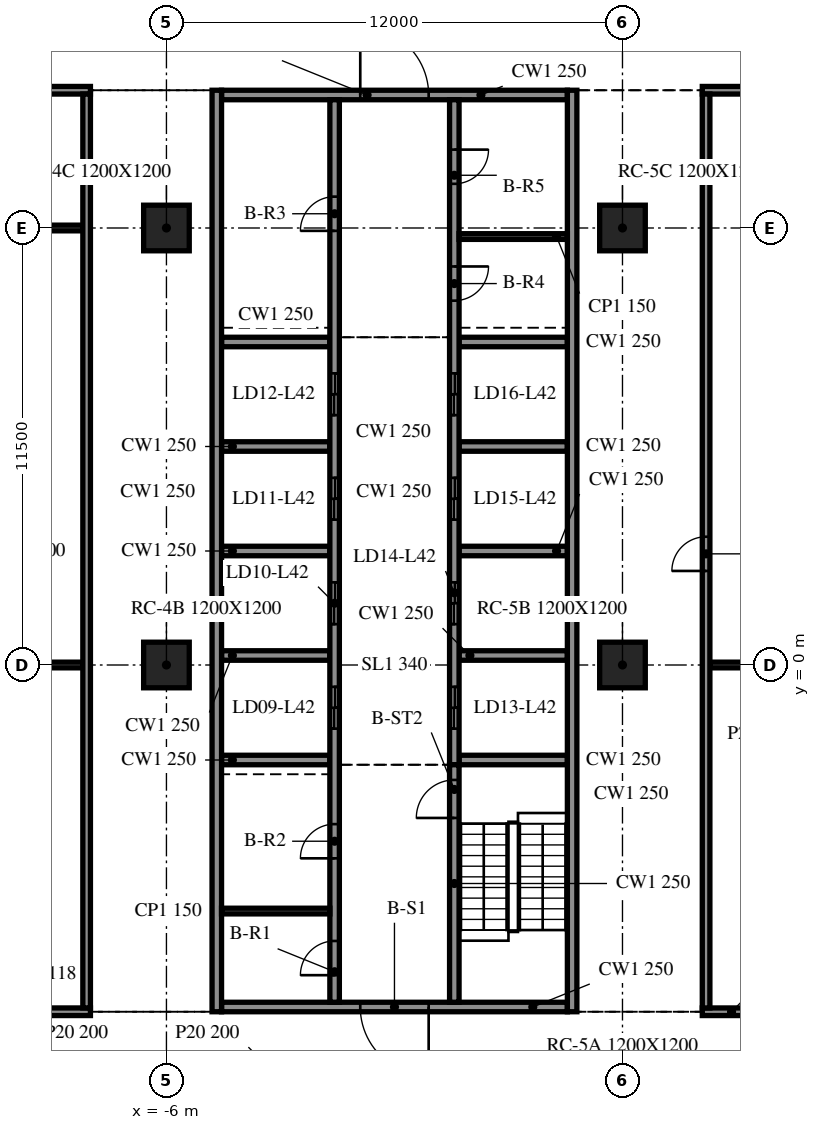
"""IFC4 building model, lengths in metres.
Left out: names, types, materials, properties, quantities, classifications, styles, units other than length and angle.
Written with IfcOpenShell. Run it as: python <this file> out.ifc"""

import sys

from ifc_helpers import new_model, si_unit, direction, frame, frame_2d, origin, origin_2d, place, context, subcontext, project, spatial, rectangle, extrude, element, fill, save


model = new_model("IFC4")
c1 = context("Model", 3, precision=1e-05, world=origin(), true_north=direction((0.0, 1.0)))
c2 = subcontext(c1, "Body", "Model", "MODEL_VIEW")
j1 = project(units=[si_unit("LENGTHUNIT", "METRE"), si_unit("PLANEANGLEUNIT", "RADIAN")], contexts=[c1])
p1 = place(None, origin())
s1 = spatial("IfcSite", under=j1, at=p1, CompositionType="ELEMENT")
p2 = place(p1, origin())
s2 = spatial("IfcBuilding", under=s1, at=p2, CompositionType="ELEMENT")
p3 = place(p2, frame((0.0, 0.0, 178.2)))
s3 = spatial("IfcBuildingStorey", under=s2, at=p3, CompositionType="ELEMENT", Elevation=178.2)
for number, where, z_axis, x_axis in (
    (1, (-6.0, 0.0, -0.34), (0.0, 0.0, 1.0), (1.0, 0.0, 0.0)),
    (2, (-6.0, 11.5, -0.34), (0.0, 0.0, 1.0), (1.0, 0.0, 0.0)),
    (3, (6.0, 0.0, -0.34), (0.0, 0.0, 1.0), (1.0, 0.0, 0.0)),
    (4, (6.0, 11.5, -0.34), (0.0, 0.0, 1.0), (1.0, 0.0, 0.0)),
):
    element("IfcColumn", number, at=place(p3, frame(where, z_axis=z_axis, x_axis=x_axis)), inside=s3, PredefinedType="COLUMN", context=c2, shape_type="SweptSolid", body=[
        extrude(rectangle(XDim=1.2, YDim=1.2, at=origin_2d()), origin(), (0.0, 0.0, 1.0), 3.8),
    ])
for number, where, z_axis, x_axis in (
    (5, (-4.675, 15.125, 0.0), (0.0, 0.0, 1.0), (0.0, -1.0, 0.0)),
    (6, (4.675, -9.125, 0.0), (0.0, 0.0, 1.0), (0.0, 1.0, 0.0)),
):
    element("IfcWall", number, at=place(p3, frame(where, z_axis=z_axis, x_axis=x_axis)), inside=s3, PredefinedType="SOLIDWALL", context=c2, shape_type="SweptSolid", body=[
        extrude(rectangle(XDim=24.25, YDim=0.25, at=frame_2d((12.125, 0.0))), origin(), (0.0, 0.0, 1.0), 3.46),
    ])
p4 = place(p3, frame((4.55, -9.0, 0.0), z_axis=(0.0, 0.0, 1.0), x_axis=(-1.0, 0.0, 0.0)))
e7 = element("IfcWall", 7, at=p4, inside=s3, PredefinedType="SOLIDWALL", context=c2, shape_type="SweptSolid", body=[
    extrude(rectangle(XDim=9.1, YDim=0.25, at=frame_2d((4.55, 0.0))), origin(), (0.0, 0.0, 1.0), 3.46),
])
p5 = place(p4, frame((3.65, 0.0, 0.0)))
e8 = element("IfcOpeningElement", 8, at=p5, cuts=e7, PredefinedType="OPENING", context=c2, shape_type="SweptSolid", body=[
    extrude(rectangle(XDim=1.8, YDim=2.1, at=frame_2d((0.9, 1.05))), frame((0.0, 0.135, 0.0), z_axis=(0.0, -1.0, 0.0), x_axis=(1.0, 0.0, 0.0)), (0.0, 0.0, 1.0), 0.27),
])
p6 = place(p3, frame((-4.55, 15.0, 0.0), z_axis=(0.0, 0.0, 1.0), x_axis=(1.0, 0.0, 0.0)))
e9 = element("IfcWall", 9, at=p6, inside=s3, PredefinedType="SOLIDWALL", context=c2, shape_type="SweptSolid", body=[
    extrude(rectangle(XDim=9.1, YDim=0.25, at=frame_2d((4.55, 0.0))), origin(), (0.0, 0.0, 1.0), 3.46),
])
p7 = place(p6, frame((3.65, 0.0, 0.0)))
e10 = element("IfcOpeningElement", 10, at=p7, cuts=e9, PredefinedType="OPENING", context=c2, shape_type="SweptSolid", body=[
    extrude(rectangle(XDim=1.8, YDim=2.1, at=frame_2d((0.9, 1.05))), frame((0.0, 0.135, 0.0), z_axis=(0.0, -1.0, 0.0), x_axis=(1.0, 0.0, 0.0)), (0.0, 0.0, 1.0), 0.27),
])
p8 = place(p3, frame((-1.575, -8.875, 0.0), z_axis=(0.0, 0.0, 1.0), x_axis=(0.0, 1.0, 0.0)))
e11 = element("IfcWall", 11, at=p8, inside=s3, PredefinedType="SOLIDWALL", context=c2, shape_type="SweptSolid", body=[
    extrude(rectangle(XDim=23.75, YDim=0.25, at=frame_2d((11.875, 0.0))), origin(), (0.0, 0.0, 1.0), 3.46),
])
p9 = place(p8, frame((7.2, 0.0, 0.0)))
e12 = element("IfcOpeningElement", 12, at=p9, cuts=e11, PredefinedType="OPENING", context=c2, shape_type="SweptSolid", body=[
    extrude(rectangle(XDim=1.1, YDim=2.1, at=frame_2d((0.55, 1.05))), frame((0.0, 0.135, 0.0), z_axis=(0.0, -1.0, 0.0), x_axis=(1.0, 0.0, 0.0)), (0.0, 0.0, 1.0), 0.27),
])
p10 = place(p8, frame((9.95, 0.0, 0.0)))
e13 = element("IfcOpeningElement", 13, at=p10, cuts=e11, PredefinedType="OPENING", context=c2, shape_type="SweptSolid", body=[
    extrude(rectangle(XDim=1.1, YDim=2.1, at=frame_2d((0.55, 1.05))), frame((0.0, 0.135, 0.0), z_axis=(0.0, -1.0, 0.0), x_axis=(1.0, 0.0, 0.0)), (0.0, 0.0, 1.0), 0.27),
])
p11 = place(p8, frame((12.7, 0.0, 0.0)))
e14 = element("IfcOpeningElement", 14, at=p11, cuts=e11, PredefinedType="OPENING", context=c2, shape_type="SweptSolid", body=[
    extrude(rectangle(XDim=1.1, YDim=2.1, at=frame_2d((0.55, 1.05))), frame((0.0, 0.135, 0.0), z_axis=(0.0, -1.0, 0.0), x_axis=(1.0, 0.0, 0.0)), (0.0, 0.0, 1.0), 0.27),
])
p12 = place(p8, frame((15.45, 0.0, 0.0)))
e15 = element("IfcOpeningElement", 15, at=p12, cuts=e11, PredefinedType="OPENING", context=c2, shape_type="SweptSolid", body=[
    extrude(rectangle(XDim=1.1, YDim=2.1, at=frame_2d((0.55, 1.05))), frame((0.0, 0.135, 0.0), z_axis=(0.0, -1.0, 0.0), x_axis=(1.0, 0.0, 0.0)), (0.0, 0.0, 1.0), 0.27),
])
p13 = place(p8, frame((0.712, 0.0, 0.0)))
e16 = element("IfcOpeningElement", 16, at=p13, cuts=e11, PredefinedType="OPENING", context=c2, shape_type="SweptSolid", body=[
    extrude(rectangle(XDim=0.9, YDim=2.1, at=frame_2d((0.45, 1.05))), frame((0.0, 0.135, 0.0), z_axis=(0.0, -1.0, 0.0), x_axis=(1.0, 0.0, 0.0)), (0.0, 0.0, 1.0), 0.27),
])
p14 = place(p8, frame((3.788, 0.0, 0.0)))
e17 = element("IfcOpeningElement", 17, at=p14, cuts=e11, PredefinedType="OPENING", context=c2, shape_type="SweptSolid", body=[
    extrude(rectangle(XDim=0.9, YDim=2.1, at=frame_2d((0.45, 1.05))), frame((0.0, 0.135, 0.0), z_axis=(0.0, -1.0, 0.0), x_axis=(1.0, 0.0, 0.0)), (0.0, 0.0, 1.0), 0.27),
])
p15 = place(p8, frame((20.3, 0.0, 0.0)))
e18 = element("IfcOpeningElement", 18, at=p15, cuts=e11, PredefinedType="OPENING", context=c2, shape_type="SweptSolid", body=[
    extrude(rectangle(XDim=0.9, YDim=2.1, at=frame_2d((0.45, 1.05))), frame((0.0, 0.135, 0.0), z_axis=(0.0, -1.0, 0.0), x_axis=(1.0, 0.0, 0.0)), (0.0, 0.0, 1.0), 0.27),
])
p16 = place(p3, frame((1.575, -8.875, 0.0), z_axis=(0.0, 0.0, 1.0), x_axis=(0.0, 1.0, 0.0)))
e19 = element("IfcWall", 19, at=p16, inside=s3, PredefinedType="SOLIDWALL", context=c2, shape_type="SweptSolid", body=[
    extrude(rectangle(XDim=6.25, YDim=0.25, at=frame_2d((3.125, 0.0))), origin(), (0.0, 0.0, 1.0), 3.46),
])
p17 = place(p16, frame((4.85, 0.0, 0.0)))
e20 = element("IfcOpeningElement", 20, at=p17, cuts=e19, PredefinedType="OPENING", context=c2, shape_type="SweptSolid", body=[
    extrude(rectangle(XDim=1.0, YDim=2.1, at=frame_2d((0.5, 1.05))), frame((0.0, 0.135, 0.0), z_axis=(0.0, -1.0, 0.0), x_axis=(1.0, 0.0, 0.0)), (0.0, 0.0, 1.0), 0.27),
])
p18 = place(p3, frame((1.575, 14.875, 0.0), z_axis=(0.0, 0.0, 1.0), x_axis=(0.0, -1.0, 0.0)))
e21 = element("IfcWall", 21, at=p18, inside=s3, PredefinedType="SOLIDWALL", context=c2, shape_type="SweptSolid", body=[
    extrude(rectangle(XDim=17.5, YDim=0.25, at=frame_2d((8.75, 0.0))), origin(), (0.0, 0.0, 1.0), 3.46),
])
p19 = place(p18, frame((15.45, 0.0, 0.0)))
e22 = element("IfcOpeningElement", 22, at=p19, cuts=e21, PredefinedType="OPENING", context=c2, shape_type="SweptSolid", body=[
    extrude(rectangle(XDim=1.1, YDim=2.1, at=frame_2d((0.55, 1.05))), frame((0.0, 0.135, 0.0), z_axis=(0.0, -1.0, 0.0), x_axis=(1.0, 0.0, 0.0)), (0.0, 0.0, 1.0), 0.27),
])
p20 = place(p18, frame((12.7, 0.0, 0.0)))
e23 = element("IfcOpeningElement", 23, at=p20, cuts=e21, PredefinedType="OPENING", context=c2, shape_type="SweptSolid", body=[
    extrude(rectangle(XDim=1.1, YDim=2.1, at=frame_2d((0.55, 1.05))), frame((0.0, 0.135, 0.0), z_axis=(0.0, -1.0, 0.0), x_axis=(1.0, 0.0, 0.0)), (0.0, 0.0, 1.0), 0.27),
])
p21 = place(p18, frame((9.95, 0.0, 0.0)))
e24 = element("IfcOpeningElement", 24, at=p21, cuts=e21, PredefinedType="OPENING", context=c2, shape_type="SweptSolid", body=[
    extrude(rectangle(XDim=1.1, YDim=2.1, at=frame_2d((0.55, 1.05))), frame((0.0, 0.135, 0.0), z_axis=(0.0, -1.0, 0.0), x_axis=(1.0, 0.0, 0.0)), (0.0, 0.0, 1.0), 0.27),
])
p22 = place(p18, frame((7.2, 0.0, 0.0)))
e25 = element("IfcOpeningElement", 25, at=p22, cuts=e21, PredefinedType="OPENING", context=c2, shape_type="SweptSolid", body=[
    extrude(rectangle(XDim=1.1, YDim=2.1, at=frame_2d((0.55, 1.05))), frame((0.0, 0.135, 0.0), z_axis=(0.0, -1.0, 0.0), x_axis=(1.0, 0.0, 0.0)), (0.0, 0.0, 1.0), 0.27),
])
p23 = place(p18, frame((4.387, 0.0, 0.0)))
e26 = element("IfcOpeningElement", 26, at=p23, cuts=e21, PredefinedType="OPENING", context=c2, shape_type="SweptSolid", body=[
    extrude(rectangle(XDim=0.9, YDim=2.1, at=frame_2d((0.45, 1.05))), frame((0.0, 0.135, 0.0), z_axis=(0.0, -1.0, 0.0), x_axis=(1.0, 0.0, 0.0)), (0.0, 0.0, 1.0), 0.27),
])
p24 = place(p18, frame((1.312, 0.0, 0.0)))
e27 = element("IfcOpeningElement", 27, at=p24, cuts=e21, PredefinedType="OPENING", context=c2, shape_type="SweptSolid", body=[
    extrude(rectangle(XDim=0.9, YDim=2.1, at=frame_2d((0.45, 1.05))), frame((0.0, 0.135, 0.0), z_axis=(0.0, -1.0, 0.0), x_axis=(1.0, 0.0, 0.0)), (0.0, 0.0, 1.0), 0.27),
])
for number, where, z_axis, x_axis in (
    (28, (-4.55, -2.5, 0.0), (0.0, 0.0, 1.0), (1.0, 0.0, 0.0)),
    (29, (-4.55, 0.25, 0.0), (0.0, 0.0, 1.0), (1.0, 0.0, 0.0)),
    (30, (-4.55, 3.0, 0.0), (0.0, 0.0, 1.0), (1.0, 0.0, 0.0)),
    (31, (-4.55, 5.75, 0.0), (0.0, 0.0, 1.0), (1.0, 0.0, 0.0)),
    (32, (-4.55, 8.5, 0.0), (0.0, 0.0, 1.0), (1.0, 0.0, 0.0)),
    (33, (1.7, -2.5, 0.0), (0.0, 0.0, 1.0), (1.0, 0.0, 0.0)),
    (34, (1.7, 0.25, 0.0), (0.0, 0.0, 1.0), (1.0, 0.0, 0.0)),
    (35, (1.7, 3.0, 0.0), (0.0, 0.0, 1.0), (1.0, 0.0, 0.0)),
    (36, (1.7, 5.75, 0.0), (0.0, 0.0, 1.0), (1.0, 0.0, 0.0)),
    (37, (1.7, 8.5, 0.0), (0.0, 0.0, 1.0), (1.0, 0.0, 0.0)),
):
    element("IfcWall", number, at=place(p3, frame(where, z_axis=z_axis, x_axis=x_axis)), inside=s3, PredefinedType="SOLIDWALL", context=c2, shape_type="SweptSolid", body=[
        extrude(rectangle(XDim=2.85, YDim=0.25, at=frame_2d((1.425, 0.0))), origin(), (0.0, 0.0, 1.0), 3.46),
    ])
for number, where, z_axis, x_axis in (
    (38, (-4.55, -6.475, 0.0), (0.0, 0.0, 1.0), (1.0, 0.0, 0.0)),
    (39, (1.7, 11.275, 0.0), (0.0, 0.0, 1.0), (1.0, 0.0, 0.0)),
):
    element("IfcWall", number, at=place(p3, frame(where, z_axis=z_axis, x_axis=x_axis)), inside=s3, PredefinedType="PARTITIONING", context=c2, shape_type="SweptSolid", body=[
        extrude(rectangle(XDim=2.85, YDim=0.15, at=frame_2d((1.425, 0.0))), origin(), (0.0, 0.0, 1.0), 3.46),
    ])
p25 = place(p3, frame((-16.1, -9.125, 0.0), z_axis=(0.0, 0.0, 1.0), x_axis=(1.0, 0.0, 0.0)))
e40 = element("IfcWall", 40, at=p25, inside=s3, PredefinedType="PARTITIONING", context=c2, shape_type="SweptSolid", body=[
    extrude(rectangle(XDim=8.1, YDim=0.2, at=frame_2d((4.05, 0.0))), origin(), (0.0, 0.0, 1.0), 3.46),
])
p26 = place(p25, frame((3.5, 0.0, 0.0)))
e41 = element("IfcOpeningElement", 41, at=p26, cuts=e40, PredefinedType="OPENING", context=c2, shape_type="SweptSolid", body=[
    extrude(rectangle(XDim=1.0, YDim=2.1, at=frame_2d((0.5, 1.05))), frame((0.0, 0.11, 0.0), z_axis=(0.0, -1.0, 0.0), x_axis=(1.0, 0.0, 0.0)), (0.0, 0.0, 1.0), 0.22),
])
p27 = place(p3, frame((8.1, -9.125, 0.0), z_axis=(0.0, 0.0, 1.0), x_axis=(1.0, 0.0, 0.0)))
e42 = element("IfcWall", 42, at=p27, inside=s3, PredefinedType="PARTITIONING", context=c2, shape_type="SweptSolid", body=[
    extrude(rectangle(XDim=7.7, YDim=0.2, at=frame_2d((3.85, 0.0))), origin(), (0.0, 0.0, 1.0), 3.46),
])
p28 = place(p27, frame((3.3, 0.0, 0.0)))
e43 = element("IfcOpeningElement", 43, at=p28, cuts=e42, PredefinedType="OPENING", context=c2, shape_type="SweptSolid", body=[
    extrude(rectangle(XDim=1.0, YDim=2.1, at=frame_2d((0.5, 1.05))), frame((0.0, 0.11, 0.0), z_axis=(0.0, -1.0, 0.0), x_axis=(1.0, 0.0, 0.0)), (0.0, 0.0, 1.0), 0.22),
])
p29 = place(p3, frame((-15.9, 0.0, 0.0), z_axis=(0.0, 0.0, 1.0), x_axis=(1.0, 0.0, 0.0)))
e44 = element("IfcWall", 44, at=p29, inside=s3, PredefinedType="PARTITIONING", context=c2, shape_type="SweptSolid", body=[
    extrude(rectangle(XDim=7.7, YDim=0.15, at=frame_2d((3.85, 0.0))), origin(), (0.0, 0.0, 1.0), 3.46),
])
p30 = place(p3, frame((8.3, 0.0, 0.0), z_axis=(0.0, 0.0, 1.0), x_axis=(1.0, 0.0, 0.0)))
e45 = element("IfcWall", 45, at=p30, inside=s3, PredefinedType="PARTITIONING", context=c2, shape_type="SweptSolid", body=[
    extrude(rectangle(XDim=7.3, YDim=0.15, at=frame_2d((3.65, 0.0))), origin(), (0.0, 0.0, 1.0), 3.46),
])
p31 = place(p3, frame((-15.9, 11.5, 0.0), z_axis=(0.0, 0.0, 1.0), x_axis=(1.0, 0.0, 0.0)))
e46 = element("IfcWall", 46, at=p31, inside=s3, PredefinedType="PARTITIONING", context=c2, shape_type="SweptSolid", body=[
    extrude(rectangle(XDim=7.7, YDim=0.15, at=frame_2d((3.85, 0.0))), origin(), (0.0, 0.0, 1.0), 3.46),
])
p32 = place(p3, frame((-16.1, 15.125, 0.0), z_axis=(0.0, 0.0, 1.0), x_axis=(1.0, 0.0, 0.0)))
e47 = element("IfcWall", 47, at=p32, inside=s3, PredefinedType="PARTITIONING", context=c2, shape_type="SweptSolid", body=[
    extrude(rectangle(XDim=8.1, YDim=0.2, at=frame_2d((4.05, 0.0))), origin(), (0.0, 0.0, 1.0), 3.46),
])
p33 = place(p32, frame((3.5, 0.0, 0.0)))
e48 = element("IfcOpeningElement", 48, at=p33, cuts=e47, PredefinedType="OPENING", context=c2, shape_type="SweptSolid", body=[
    extrude(rectangle(XDim=1.0, YDim=2.1, at=frame_2d((0.5, 1.05))), frame((0.0, 0.11, 0.0), z_axis=(0.0, -1.0, 0.0), x_axis=(1.0, 0.0, 0.0)), (0.0, 0.0, 1.0), 0.22),
])
p34 = place(p3, frame((8.1, 15.125, 0.0), z_axis=(0.0, 0.0, 1.0), x_axis=(1.0, 0.0, 0.0)))
e49 = element("IfcWall", 49, at=p34, inside=s3, PredefinedType="PARTITIONING", context=c2, shape_type="SweptSolid", body=[
    extrude(rectangle(XDim=7.7, YDim=0.2, at=frame_2d((3.85, 0.0))), origin(), (0.0, 0.0, 1.0), 3.46),
])
p35 = place(p3, frame((-8.1, -9.025, 0.0), z_axis=(0.0, 0.0, 1.0), x_axis=(0.0, 1.0, 0.0)))
e50 = element("IfcWall", 50, at=p35, inside=s3, PredefinedType="PARTITIONING", context=c2, shape_type="SweptSolid", body=[
    extrude(rectangle(XDim=24.05, YDim=0.2, at=frame_2d((12.025, 0.0))), origin(), (0.0, 0.0, 1.0), 3.46),
])
p36 = place(p3, frame((8.2, -9.025, 0.0), z_axis=(0.0, 0.0, 1.0), x_axis=(0.0, 1.0, 0.0)))
e51 = element("IfcWall", 51, at=p36, inside=s3, PredefinedType="PARTITIONING", context=c2, shape_type="SweptSolid", body=[
    extrude(rectangle(XDim=24.05, YDim=0.2, at=frame_2d((12.025, 0.0))), origin(), (0.0, 0.0, 1.0), 3.46),
])
p37 = place(p36, frame((11.5, 0.0, 0.0)))
e52 = element("IfcOpeningElement", 52, at=p37, cuts=e51, PredefinedType="OPENING", context=c2, shape_type="SweptSolid", body=[
    extrude(rectangle(XDim=0.9, YDim=2.1, at=frame_2d((0.45, 1.05))), frame((0.0, 0.11, 0.0), z_axis=(0.0, -1.0, 0.0), x_axis=(1.0, 0.0, 0.0)), (0.0, 0.0, 1.0), 0.22),
])
p38 = place(p5, origin())
e53 = element("IfcDoor", 53, at=p38, inside=s3, OperationType="DOUBLE_DOOR_SINGLE_SWING", PredefinedType="DOOR", context=c2, shape_type="SweptSolid", body=[
    extrude(rectangle(XDim=1.8, YDim=2.1, at=frame_2d((0.9, 1.05))), frame((0.0, 0.025, 0.0), z_axis=(0.0, -1.0, 0.0), x_axis=(1.0, 0.0, 0.0)), (0.0, 0.0, 1.0), 0.05),
])
fill(e8, e53)
p39 = place(p7, origin())
e54 = element("IfcDoor", 54, at=p39, inside=s3, OperationType="DOUBLE_DOOR_SINGLE_SWING", PredefinedType="DOOR", context=c2, shape_type="SweptSolid", body=[
    extrude(rectangle(XDim=1.8, YDim=2.1, at=frame_2d((0.9, 1.05))), frame((0.0, 0.025, 0.0), z_axis=(0.0, -1.0, 0.0), x_axis=(1.0, 0.0, 0.0)), (0.0, 0.0, 1.0), 0.05),
])
fill(e10, e54)
p40 = place(p19, origin())
e55 = element("IfcDoor", 55, at=p40, inside=s3, OperationType="DOUBLE_DOOR_SLIDING", PredefinedType="DOOR", context=c2, shape_type="SweptSolid", body=[
    extrude(rectangle(XDim=1.1, YDim=2.1, at=frame_2d((0.55, 1.05))), frame((0.0, 0.025, 0.0), z_axis=(0.0, -1.0, 0.0), x_axis=(1.0, 0.0, 0.0)), (0.0, 0.0, 1.0), 0.05),
])
fill(e22, e55)
p41 = place(p20, origin())
e56 = element("IfcDoor", 56, at=p41, inside=s3, OperationType="DOUBLE_DOOR_SLIDING", PredefinedType="DOOR", context=c2, shape_type="SweptSolid", body=[
    extrude(rectangle(XDim=1.1, YDim=2.1, at=frame_2d((0.55, 1.05))), frame((0.0, 0.025, 0.0), z_axis=(0.0, -1.0, 0.0), x_axis=(1.0, 0.0, 0.0)), (0.0, 0.0, 1.0), 0.05),
])
fill(e23, e56)
p42 = place(p21, origin())
e57 = element("IfcDoor", 57, at=p42, inside=s3, OperationType="DOUBLE_DOOR_SLIDING", PredefinedType="DOOR", context=c2, shape_type="SweptSolid", body=[
    extrude(rectangle(XDim=1.1, YDim=2.1, at=frame_2d((0.55, 1.05))), frame((0.0, 0.025, 0.0), z_axis=(0.0, -1.0, 0.0), x_axis=(1.0, 0.0, 0.0)), (0.0, 0.0, 1.0), 0.05),
])
fill(e24, e57)
p43 = place(p22, origin())
e58 = element("IfcDoor", 58, at=p43, inside=s3, OperationType="DOUBLE_DOOR_SLIDING", PredefinedType="DOOR", context=c2, shape_type="SweptSolid", body=[
    extrude(rectangle(XDim=1.1, YDim=2.1, at=frame_2d((0.55, 1.05))), frame((0.0, 0.025, 0.0), z_axis=(0.0, -1.0, 0.0), x_axis=(1.0, 0.0, 0.0)), (0.0, 0.0, 1.0), 0.05),
])
fill(e25, e58)
p44 = place(p9, origin())
e59 = element("IfcDoor", 59, at=p44, inside=s3, OperationType="DOUBLE_DOOR_SLIDING", PredefinedType="DOOR", context=c2, shape_type="SweptSolid", body=[
    extrude(rectangle(XDim=1.1, YDim=2.1, at=frame_2d((0.55, 1.05))), frame((0.0, 0.025, 0.0), z_axis=(0.0, -1.0, 0.0), x_axis=(1.0, 0.0, 0.0)), (0.0, 0.0, 1.0), 0.05),
])
fill(e12, e59)
p45 = place(p10, origin())
e60 = element("IfcDoor", 60, at=p45, inside=s3, OperationType="DOUBLE_DOOR_SLIDING", PredefinedType="DOOR", context=c2, shape_type="SweptSolid", body=[
    extrude(rectangle(XDim=1.1, YDim=2.1, at=frame_2d((0.55, 1.05))), frame((0.0, 0.025, 0.0), z_axis=(0.0, -1.0, 0.0), x_axis=(1.0, 0.0, 0.0)), (0.0, 0.0, 1.0), 0.05),
])
fill(e13, e60)
p46 = place(p11, origin())
e61 = element("IfcDoor", 61, at=p46, inside=s3, OperationType="DOUBLE_DOOR_SLIDING", PredefinedType="DOOR", context=c2, shape_type="SweptSolid", body=[
    extrude(rectangle(XDim=1.1, YDim=2.1, at=frame_2d((0.55, 1.05))), frame((0.0, 0.025, 0.0), z_axis=(0.0, -1.0, 0.0), x_axis=(1.0, 0.0, 0.0)), (0.0, 0.0, 1.0), 0.05),
])
fill(e14, e61)
p47 = place(p12, origin())
e62 = element("IfcDoor", 62, at=p47, inside=s3, OperationType="DOUBLE_DOOR_SLIDING", PredefinedType="DOOR", context=c2, shape_type="SweptSolid", body=[
    extrude(rectangle(XDim=1.1, YDim=2.1, at=frame_2d((0.55, 1.05))), frame((0.0, 0.025, 0.0), z_axis=(0.0, -1.0, 0.0), x_axis=(1.0, 0.0, 0.0)), (0.0, 0.0, 1.0), 0.05),
])
fill(e15, e62)
p48 = place(p13, origin())
e63 = element("IfcDoor", 63, at=p48, inside=s3, OperationType="SINGLE_SWING_LEFT", PredefinedType="DOOR", context=c2, shape_type="SweptSolid", body=[
    extrude(rectangle(XDim=0.9, YDim=2.1, at=frame_2d((0.45, 1.05))), frame((0.0, 0.025, 0.0), z_axis=(0.0, -1.0, 0.0), x_axis=(1.0, 0.0, 0.0)), (0.0, 0.0, 1.0), 0.05),
])
fill(e16, e63)
p49 = place(p14, origin())
e64 = element("IfcDoor", 64, at=p49, inside=s3, OperationType="SINGLE_SWING_RIGHT", PredefinedType="DOOR", context=c2, shape_type="SweptSolid", body=[
    extrude(rectangle(XDim=0.9, YDim=2.1, at=frame_2d((0.45, 1.05))), frame((0.0, 0.025, 0.0), z_axis=(0.0, -1.0, 0.0), x_axis=(1.0, 0.0, 0.0)), (0.0, 0.0, 1.0), 0.05),
])
fill(e17, e64)
p50 = place(p15, origin())
e65 = element("IfcDoor", 65, at=p50, inside=s3, OperationType="SINGLE_SWING_LEFT", PredefinedType="DOOR", context=c2, shape_type="SweptSolid", body=[
    extrude(rectangle(XDim=0.9, YDim=2.1, at=frame_2d((0.45, 1.05))), frame((0.0, 0.025, 0.0), z_axis=(0.0, -1.0, 0.0), x_axis=(1.0, 0.0, 0.0)), (0.0, 0.0, 1.0), 0.05),
])
fill(e18, e65)
p51 = place(p23, origin())
e66 = element("IfcDoor", 66, at=p51, inside=s3, OperationType="SINGLE_SWING_RIGHT", PredefinedType="DOOR", context=c2, shape_type="SweptSolid", body=[
    extrude(rectangle(XDim=0.9, YDim=2.1, at=frame_2d((0.45, 1.05))), frame((0.0, 0.025, 0.0), z_axis=(0.0, -1.0, 0.0), x_axis=(1.0, 0.0, 0.0)), (0.0, 0.0, 1.0), 0.05),
])
fill(e26, e66)
p52 = place(p24, origin())
e67 = element("IfcDoor", 67, at=p52, inside=s3, OperationType="SINGLE_SWING_LEFT", PredefinedType="DOOR", context=c2, shape_type="SweptSolid", body=[
    extrude(rectangle(XDim=0.9, YDim=2.1, at=frame_2d((0.45, 1.05))), frame((0.0, 0.025, 0.0), z_axis=(0.0, -1.0, 0.0), x_axis=(1.0, 0.0, 0.0)), (0.0, 0.0, 1.0), 0.05),
])
fill(e27, e67)
p53 = place(p17, origin())
e68 = element("IfcDoor", 68, at=p53, inside=s3, OperationType="SINGLE_SWING_RIGHT", PredefinedType="DOOR", context=c2, shape_type="SweptSolid", body=[
    extrude(rectangle(XDim=1.0, YDim=2.1, at=frame_2d((0.5, 1.05))), frame((0.0, 0.025, 0.0), z_axis=(0.0, -1.0, 0.0), x_axis=(1.0, 0.0, 0.0)), (0.0, 0.0, 1.0), 0.05),
])
fill(e20, e68)
p54 = place(p37, origin())
e69 = element("IfcDoor", 69, at=p54, inside=s3, OperationType="SINGLE_SWING_RIGHT", PredefinedType="DOOR", context=c2, shape_type="SweptSolid", body=[
    extrude(rectangle(XDim=0.9, YDim=2.1, at=frame_2d((0.45, 1.05))), frame((0.0, 0.025, 0.0), z_axis=(0.0, -1.0, 0.0), x_axis=(1.0, 0.0, 0.0)), (0.0, 0.0, 1.0), 0.05),
])
fill(e52, e69)
save(model, sys.argv[1])
